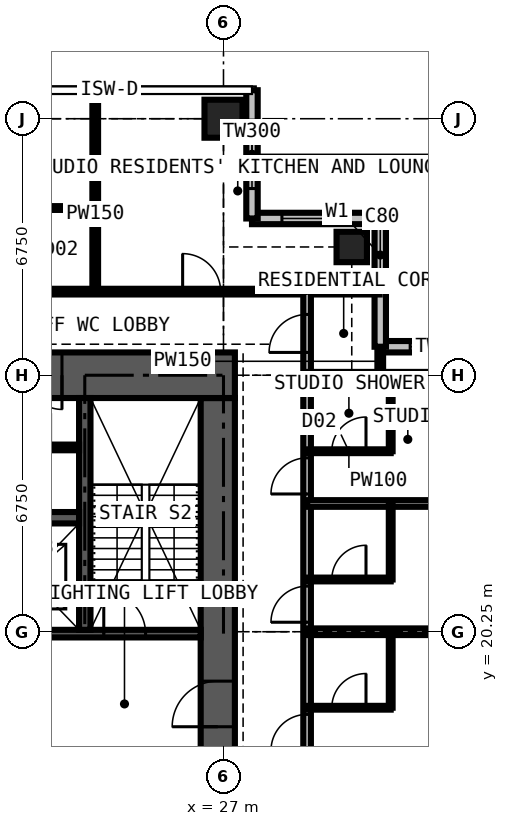
"""IFC4 building model, lengths in metres.
Left out: names, types, materials, properties, quantities, classifications, styles, units other than length and angle.
Written with IfcOpenShell. Run it as: python <this file> out.ifc"""

import sys

from ifc_helpers import new_model, si_unit, direction, frame, frame_2d, origin, origin_2d, place, context, subcontext, project, spatial, rectangle, extrude, element, fill, save


model = new_model("IFC4")
c1 = context("Model", 3, precision=1e-05, world=origin(), true_north=direction((0.0, 1.0)))
c2 = subcontext(c1, "Body", "Model", "MODEL_VIEW")
j1 = project(units=[si_unit("LENGTHUNIT", "METRE"), si_unit("PLANEANGLEUNIT", "RADIAN")], contexts=[c1])
p1 = place(None, origin())
s1 = spatial("IfcSite", under=j1, at=p1, CompositionType="ELEMENT")
p2 = place(p1, origin())
s2 = spatial("IfcBuilding", under=s1, at=p2, CompositionType="ELEMENT")
p3 = place(p2, frame((0.0, 0.0, 247.5)))
s3 = spatial("IfcBuildingStorey", under=s2, at=p3, CompositionType="ELEMENT", Elevation=247.5)
p4 = place(p3, frame((27.0, 33.75, 0.0), z_axis=(0.0, 0.0, 1.0), x_axis=(1.0, 0.0, 0.0)))
e1 = element("IfcColumn", 1, at=p4, inside=s3, PredefinedType="COLUMN", context=c2, shape_type="SweptSolid", body=[
    extrude(rectangle(XDim=1.0, YDim=1.0, at=origin_2d()), origin(), (0.0, 0.0, 1.0), 3.6),
])
p5 = place(p3, frame((30.375, 30.375, 0.0), z_axis=(0.0, 0.0, 1.0), x_axis=(1.0, 0.0, 0.0)))
e2 = element("IfcColumn", 2, at=p5, inside=s3, PredefinedType="COLUMN", context=c2, shape_type="SweptSolid", body=[
    extrude(rectangle(XDim=0.8, YDim=0.8, at=origin_2d()), origin(), (0.0, 0.0, 1.0), 3.6),
])
p6 = place(p3, frame((26.85, 14.1, 0.0), z_axis=(0.0, 0.0, 1.0), x_axis=(0.0, 1.0, 0.0)))
e3 = element("IfcWall", 3, at=p6, inside=s3, PredefinedType="SHEAR", context=c2, shape_type="SweptSolid", body=[
    extrude(rectangle(XDim=12.3, YDim=0.9, at=frame_2d((6.15, 0.0))), origin(), (0.0, 0.0, 1.0), 3.6),
])
p7 = place(p6, frame((3.65, 0.0, 0.0)))
e4 = element("IfcOpeningElement", 4, at=p7, cuts=e3, PredefinedType="OPENING", context=c2, shape_type="SweptSolid", body=[
    extrude(rectangle(XDim=1.2, YDim=2.2, at=frame_2d((0.6, 1.1))), frame((0.0, 0.46, 0.0), z_axis=(0.0, -1.0, 0.0), x_axis=(1.0, 0.0, 0.0)), (0.0, 0.0, 1.0), 0.92),
])
p8 = place(p3, frame((27.3, 27.0, 0.0), z_axis=(0.0, 0.0, 1.0), x_axis=(-1.0, 0.0, 0.0)))
e5 = element("IfcWall", 5, at=p8, inside=s3, PredefinedType="SHEAR", context=c2, shape_type="SweptSolid", body=[
    extrude(rectangle(XDim=14.1, YDim=1.2, at=frame_2d((7.05, 0.0))), origin(), (0.0, 0.0, 1.0), 3.6),
])
p9 = place(p8, frame((4.55, 0.0, 0.0)))
e6 = element("IfcOpeningElement", 6, at=p9, cuts=e5, PredefinedType="OPENING", context=c2, shape_type="SweptSolid", body=[
    extrude(rectangle(XDim=0.9, YDim=2.2, at=frame_2d((0.45, 1.1))), frame((0.0, 0.61, 0.0), z_axis=(0.0, -1.0, 0.0), x_axis=(1.0, 0.0, 0.0)), (0.0, 0.0, 1.0), 1.22),
])
p10 = place(p8, frame((7.525, 0.0, 0.0)))
e7 = element("IfcOpeningElement", 7, at=p10, cuts=e5, PredefinedType="OPENING", context=c2, shape_type="SweptSolid", body=[
    extrude(rectangle(XDim=1.0, YDim=2.2, at=frame_2d((0.5, 1.1))), frame((0.0, 0.61, 0.0), z_axis=(0.0, -1.0, 0.0), x_axis=(1.0, 0.0, 0.0)), (0.0, 0.0, 1.0), 1.22),
])
p11 = place(p3, frame((34.5, 27.75, 0.0), z_axis=(0.0, 0.0, 1.0), x_axis=(-1.0, 0.0, 0.0)))
e8 = element("IfcWall", 8, at=p11, inside=s3, PredefinedType="SOLIDWALL", context=c2, shape_type="SweptSolid", body=[
    extrude(rectangle(XDim=3.375, YDim=0.3, at=frame_2d((1.688, 0.0))), origin(), (0.0, 0.0, 1.0), 3.375),
])
p12 = place(p11, frame((0.788, 0.0, 0.6)))
e9 = element("IfcOpeningElement", 9, at=p12, cuts=e8, PredefinedType="OPENING", context=c2, shape_type="SweptSolid", body=[
    extrude(rectangle(XDim=1.8, YDim=2.1, at=frame_2d((0.9, 1.05))), frame((0.0, 0.16, 0.0), z_axis=(0.0, -1.0, 0.0), x_axis=(1.0, 0.0, 0.0)), (0.0, 0.0, 1.0), 0.32),
])
p13 = place(p3, frame((31.125, 27.75, 0.0), z_axis=(0.0, 0.0, 1.0), x_axis=(0.0, 1.0, 0.0)))
e10 = element("IfcWall", 10, at=p13, inside=s3, PredefinedType="SOLIDWALL", context=c2, shape_type="SweptSolid", body=[
    extrude(rectangle(XDim=3.375, YDim=0.3, at=frame_2d((1.688, 0.0))), origin(), (0.0, 0.0, 1.0), 3.375),
])
p14 = place(p13, frame((1.663, 0.0, 0.9)))
e11 = element("IfcOpeningElement", 11, at=p14, cuts=e10, PredefinedType="OPENING", context=c2, shape_type="SweptSolid", body=[
    extrude(rectangle(XDim=1.5, YDim=1.8, at=frame_2d((0.75, 0.9))), frame((0.0, 0.16, 0.0), z_axis=(0.0, -1.0, 0.0), x_axis=(1.0, 0.0, 0.0)), (0.0, 0.0, 1.0), 0.32),
])
p15 = place(p3, frame((31.125, 31.125, 0.0), z_axis=(0.0, 0.0, 1.0), x_axis=(-1.0, 0.0, 0.0)))
e12 = element("IfcWall", 12, at=p15, inside=s3, PredefinedType="SOLIDWALL", context=c2, shape_type="SweptSolid", body=[
    extrude(rectangle(XDim=3.375, YDim=0.3, at=frame_2d((1.688, 0.0))), origin(), (0.0, 0.0, 1.0), 3.375),
])
p16 = place(p15, frame((0.788, 0.0, 0.6)))
e13 = element("IfcOpeningElement", 13, at=p16, cuts=e12, PredefinedType="OPENING", context=c2, shape_type="SweptSolid", body=[
    extrude(rectangle(XDim=1.8, YDim=2.1, at=frame_2d((0.9, 1.05))), frame((0.0, 0.16, 0.0), z_axis=(0.0, -1.0, 0.0), x_axis=(1.0, 0.0, 0.0)), (0.0, 0.0, 1.0), 0.32),
])
p17 = place(p3, frame((27.75, 31.125, 0.0), z_axis=(0.0, 0.0, 1.0), x_axis=(0.0, 1.0, 0.0)))
e14 = element("IfcWall", 14, at=p17, inside=s3, PredefinedType="SOLIDWALL", context=c2, shape_type="SweptSolid", body=[
    extrude(rectangle(XDim=3.375, YDim=0.3, at=frame_2d((1.688, 0.0))), origin(), (0.0, 0.0, 1.0), 3.375),
])
p18 = place(p17, frame((0.788, 0.0, 0.6)))
e15 = element("IfcOpeningElement", 15, at=p18, cuts=e14, PredefinedType="OPENING", context=c2, shape_type="SweptSolid", body=[
    extrude(rectangle(XDim=1.8, YDim=2.1, at=frame_2d((0.9, 1.05))), frame((0.0, 0.16, 0.0), z_axis=(0.0, -1.0, 0.0), x_axis=(1.0, 0.0, 0.0)), (0.0, 0.0, 1.0), 0.32),
])
p19 = place(p3, frame((14.1, 20.2, 0.0), z_axis=(0.0, 0.0, 1.0), x_axis=(1.0, 0.0, 0.0)))
e16 = element("IfcWall", 16, at=p19, inside=s3, PredefinedType="SHEAR", context=c2, shape_type="SweptSolid", body=[
    extrude(rectangle(XDim=12.3, YDim=0.2, at=frame_2d((6.15, 0.0))), origin(), (0.0, 0.0, 1.0), 3.6),
])
p20 = place(p19, frame((4.56, 0.0, 0.0)))
e17 = element("IfcOpeningElement", 17, at=p20, cuts=e16, PredefinedType="OPENING", context=c2, shape_type="SweptSolid", body=[
    extrude(rectangle(XDim=1.1, YDim=2.2, at=frame_2d((0.55, 1.1))), frame((0.0, 0.11, 0.0), z_axis=(0.0, -1.0, 0.0), x_axis=(1.0, 0.0, 0.0)), (0.0, 0.0, 1.0), 0.22),
])
p21 = place(p19, frame((6.7, 0.0, 0.0)))
e18 = element("IfcOpeningElement", 18, at=p21, cuts=e16, PredefinedType="OPENING", context=c2, shape_type="SweptSolid", body=[
    extrude(rectangle(XDim=1.1, YDim=2.2, at=frame_2d((0.55, 1.1))), frame((0.0, 0.11, 0.0), z_axis=(0.0, -1.0, 0.0), x_axis=(1.0, 0.0, 0.0)), (0.0, 0.0, 1.0), 0.22),
])
p22 = place(p19, frame((0.35, 0.0, 0.0)))
e19 = element("IfcOpeningElement", 19, at=p22, cuts=e16, PredefinedType="OPENING", context=c2, shape_type="SweptSolid", body=[
    extrude(rectangle(XDim=1.1, YDim=2.2, at=frame_2d((0.55, 1.1))), frame((0.0, 0.11, 0.0), z_axis=(0.0, -1.0, 0.0), x_axis=(1.0, 0.0, 0.0)), (0.0, 0.0, 1.0), 0.22),
])
p23 = place(p19, frame((9.75, 0.0, 0.0)))
e20 = element("IfcOpeningElement", 20, at=p23, cuts=e16, PredefinedType="OPENING", context=c2, shape_type="SweptSolid", body=[
    extrude(rectangle(XDim=1.1, YDim=2.2, at=frame_2d((0.55, 1.1))), frame((0.0, 0.11, 0.0), z_axis=(0.0, -1.0, 0.0), x_axis=(1.0, 0.0, 0.0)), (0.0, 0.0, 1.0), 0.22),
])
p24 = place(p3, frame((23.35, 20.3, 0.0), z_axis=(0.0, 0.0, 1.0), x_axis=(0.0, 1.0, 0.0)))
e21 = element("IfcWall", 21, at=p24, inside=s3, PredefinedType="SHEAR", context=c2, shape_type="SweptSolid", body=[
    extrude(rectangle(XDim=6.1, YDim=0.3, at=frame_2d((3.05, 0.0))), origin(), (0.0, 0.0, 1.0), 3.6),
])
p25 = place(p3, frame((17.3, 23.25, 0.0), z_axis=(0.0, 0.0, 1.0), x_axis=(1.0, 0.0, 0.0)))
e22 = element("IfcWall", 22, at=p25, inside=s3, PredefinedType="SHEAR", context=c2, shape_type="SweptSolid", body=[
    extrude(rectangle(XDim=5.9, YDim=0.3, at=frame_2d((2.95, 0.0))), origin(), (0.0, 0.0, 1.0), 3.6),
])
p26 = place(p3, frame((20.8, 25.1, 0.0), z_axis=(0.0, 0.0, 1.0), x_axis=(1.0, 0.0, 0.0)))
e23 = element("IfcWall", 23, at=p26, inside=s3, PredefinedType="PARTITIONING", context=c2, shape_type="SweptSolid", body=[
    extrude(rectangle(XDim=2.4, YDim=0.15, at=frame_2d((1.2, 0.0))), origin(), (0.0, 0.0, 1.0), 3.375),
])
p27 = place(p26, frame((0.75, 0.0, 0.0)))
e24 = element("IfcOpeningElement", 24, at=p27, cuts=e23, PredefinedType="OPENING", context=c2, shape_type="SweptSolid", body=[
    extrude(rectangle(XDim=0.9, YDim=2.2, at=frame_2d((0.45, 1.1))), frame((0.0, 0.085, 0.0), z_axis=(0.0, -1.0, 0.0), x_axis=(1.0, 0.0, 0.0)), (0.0, 0.0, 1.0), 0.17),
])
p28 = place(p3, frame((11.3, 29.2, 0.0), z_axis=(0.0, 0.0, 1.0), x_axis=(1.0, 0.0, 0.0)))
e25 = element("IfcWall", 25, at=p28, inside=s3, PredefinedType="PARTITIONING", context=c2, shape_type="SweptSolid", body=[
    extrude(rectangle(XDim=19.809, YDim=0.15, at=frame_2d((9.904, 0.0))), origin(), (0.0, 0.0, 1.0), 3.375),
])
p29 = place(p28, frame((14.625, 0.0, 0.0)))
e26 = element("IfcOpeningElement", 26, at=p29, cuts=e25, PredefinedType="OPENING", context=c2, shape_type="SweptSolid", body=[
    extrude(rectangle(XDim=1.0, YDim=2.2, at=frame_2d((0.5, 1.1))), frame((0.0, 0.085, 0.0), z_axis=(0.0, -1.0, 0.0), x_axis=(1.0, 0.0, 0.0)), (0.0, 0.0, 1.0), 0.17),
])
p30 = place(p28, frame((6.4, 0.0, 0.0)))
e27 = element("IfcOpeningElement", 27, at=p30, cuts=e25, PredefinedType="OPENING", context=c2, shape_type="SweptSolid", body=[
    extrude(rectangle(XDim=0.95, YDim=2.2, at=frame_2d((0.475, 1.1))), frame((0.0, 0.085, 0.0), z_axis=(0.0, -1.0, 0.0), x_axis=(1.0, 0.0, 0.0)), (0.0, 0.0, 1.0), 0.17),
])
p31 = place(p28, frame((9.2, 0.0, 0.0)))
e28 = element("IfcOpeningElement", 28, at=p31, cuts=e25, PredefinedType="OPENING", context=c2, shape_type="SweptSolid", body=[
    extrude(rectangle(XDim=0.95, YDim=2.2, at=frame_2d((0.475, 1.1))), frame((0.0, 0.085, 0.0), z_axis=(0.0, -1.0, 0.0), x_axis=(1.0, 0.0, 0.0)), (0.0, 0.0, 1.0), 0.17),
])
p32 = place(p28, frame((0.6, 0.0, 0.0)))
e29 = element("IfcOpeningElement", 29, at=p32, cuts=e25, PredefinedType="OPENING", context=c2, shape_type="SweptSolid", body=[
    extrude(rectangle(XDim=1.0, YDim=2.2, at=frame_2d((0.5, 1.1))), frame((0.0, 0.085, 0.0), z_axis=(0.0, -1.0, 0.0), x_axis=(1.0, 0.0, 0.0)), (0.0, 0.0, 1.0), 0.17),
])
p33 = place(p3, frame((21.625, 31.4, 0.0), z_axis=(0.0, 0.0, 1.0), x_axis=(1.0, 0.0, 0.0)))
e30 = element("IfcWall", 30, at=p33, inside=s3, PredefinedType="PARTITIONING", context=c2, shape_type="SweptSolid", body=[
    extrude(rectangle(XDim=2.0, YDim=0.1, at=frame_2d((1.0, 0.0))), origin(), (0.0, 0.0, 1.0), 3.375),
])
p34 = place(p3, frame((23.625, 29.2, 0.0), z_axis=(0.0, 0.0, 1.0), x_axis=(0.0, 1.0, 0.0)))
e31 = element("IfcWall", 31, at=p34, inside=s3, PredefinedType="PARTITIONING", context=c2, shape_type="SweptSolid", body=[
    extrude(rectangle(XDim=5.284, YDim=0.15, at=frame_2d((2.642, 0.0))), origin(), (0.0, 0.0, 1.0), 3.375),
])
p35 = place(p3, frame((29.2, 11.3, 0.0), z_axis=(0.0, 0.0, 1.0), x_axis=(0.0, 1.0, 0.0)))
e32 = element("IfcWall", 32, at=p35, inside=s3, PredefinedType="PARTITIONING", context=c2, shape_type="SweptSolid", body=[
    extrude(rectangle(XDim=17.9, YDim=0.2, at=frame_2d((8.95, 0.0))), origin(), (0.0, 0.0, 1.0), 3.375),
])
p36 = place(p35, frame((0.6, 0.0, 0.0)))
e33 = element("IfcOpeningElement", 33, at=p36, cuts=e32, PredefinedType="OPENING", context=c2, shape_type="SweptSolid", body=[
    extrude(rectangle(XDim=1.0, YDim=2.2, at=frame_2d((0.5, 1.1))), frame((0.0, 0.11, 0.0), z_axis=(0.0, -1.0, 0.0), x_axis=(1.0, 0.0, 0.0)), (0.0, 0.0, 1.0), 0.22),
])
p37 = place(p35, frame((2.4, 0.0, 0.0)))
e34 = element("IfcOpeningElement", 34, at=p37, cuts=e32, PredefinedType="OPENING", context=c2, shape_type="SweptSolid", body=[
    extrude(rectangle(XDim=0.95, YDim=2.2, at=frame_2d((0.475, 1.1))), frame((0.0, 0.11, 0.0), z_axis=(0.0, -1.0, 0.0), x_axis=(1.0, 0.0, 0.0)), (0.0, 0.0, 1.0), 0.22),
])
p38 = place(p35, frame((5.825, 0.0, 0.0)))
e35 = element("IfcOpeningElement", 35, at=p38, cuts=e32, PredefinedType="OPENING", context=c2, shape_type="SweptSolid", body=[
    extrude(rectangle(XDim=0.95, YDim=2.2, at=frame_2d((0.475, 1.1))), frame((0.0, 0.11, 0.0), z_axis=(0.0, -1.0, 0.0), x_axis=(1.0, 0.0, 0.0)), (0.0, 0.0, 1.0), 0.22),
])
p39 = place(p35, frame((9.2, 0.0, 0.0)))
e36 = element("IfcOpeningElement", 36, at=p39, cuts=e32, PredefinedType="OPENING", context=c2, shape_type="SweptSolid", body=[
    extrude(rectangle(XDim=0.95, YDim=2.2, at=frame_2d((0.475, 1.1))), frame((0.0, 0.11, 0.0), z_axis=(0.0, -1.0, 0.0), x_axis=(1.0, 0.0, 0.0)), (0.0, 0.0, 1.0), 0.22),
])
p40 = place(p35, frame((12.575, 0.0, 0.0)))
e37 = element("IfcOpeningElement", 37, at=p40, cuts=e32, PredefinedType="OPENING", context=c2, shape_type="SweptSolid", body=[
    extrude(rectangle(XDim=0.95, YDim=2.2, at=frame_2d((0.475, 1.1))), frame((0.0, 0.11, 0.0), z_axis=(0.0, -1.0, 0.0), x_axis=(1.0, 0.0, 0.0)), (0.0, 0.0, 1.0), 0.22),
])
p41 = place(p35, frame((16.3, 0.0, 0.0)))
e38 = element("IfcOpeningElement", 38, at=p41, cuts=e32, PredefinedType="OPENING", context=c2, shape_type="SweptSolid", body=[
    extrude(rectangle(XDim=1.0, YDim=2.2, at=frame_2d((0.5, 1.1))), frame((0.0, 0.11, 0.0), z_axis=(0.0, -1.0, 0.0), x_axis=(1.0, 0.0, 0.0)), (0.0, 0.0, 1.0), 0.22),
])
p42 = place(p3, frame((29.2, 18.25, 0.0), z_axis=(0.0, 0.0, 1.0), x_axis=(1.0, 0.0, 0.0)))
e39 = element("IfcWall", 39, at=p42, inside=s3, PredefinedType="PARTITIONING", context=c2, shape_type="SweptSolid", body=[
    extrude(rectangle(XDim=2.2, YDim=0.1, at=frame_2d((1.1, 0.0))), origin(), (0.0, 0.0, 1.0), 3.375),
])
p43 = place(p42, frame((0.65, 0.0, 0.0)))
e40 = element("IfcOpeningElement", 40, at=p43, cuts=e39, PredefinedType="OPENING", context=c2, shape_type="SweptSolid", body=[
    extrude(rectangle(XDim=0.9, YDim=2.2, at=frame_2d((0.45, 1.1))), frame((0.0, 0.06, 0.0), z_axis=(0.0, -1.0, 0.0), x_axis=(1.0, 0.0, 0.0)), (0.0, 0.0, 1.0), 0.12),
])
p44 = place(p3, frame((29.2, 20.25, 0.0), z_axis=(0.0, 0.0, 1.0), x_axis=(1.0, 0.0, 0.0)))
e41 = element("IfcWall", 41, at=p44, inside=s3, PredefinedType="PARTITIONING", context=c2, shape_type="SweptSolid", body=[
    extrude(rectangle(XDim=5.284, YDim=0.175, at=frame_2d((2.642, 0.0))), origin(), (0.0, 0.0, 1.0), 2.877),
])
p45 = place(p3, frame((29.2, 21.625, 0.0), z_axis=(0.0, 0.0, 1.0), x_axis=(1.0, 0.0, 0.0)))
e42 = element("IfcWall", 42, at=p45, inside=s3, PredefinedType="PARTITIONING", context=c2, shape_type="SweptSolid", body=[
    extrude(rectangle(XDim=2.2, YDim=0.1, at=frame_2d((1.1, 0.0))), origin(), (0.0, 0.0, 1.0), 3.375),
])
p46 = place(p45, frame((0.65, 0.0, 0.0)))
e43 = element("IfcOpeningElement", 43, at=p46, cuts=e42, PredefinedType="OPENING", context=c2, shape_type="SweptSolid", body=[
    extrude(rectangle(XDim=0.9, YDim=2.2, at=frame_2d((0.45, 1.1))), frame((0.0, 0.06, 0.0), z_axis=(0.0, -1.0, 0.0), x_axis=(1.0, 0.0, 0.0)), (0.0, 0.0, 1.0), 0.12),
])
p47 = place(p3, frame((29.2, 23.625, 0.0), z_axis=(0.0, 0.0, 1.0), x_axis=(1.0, 0.0, 0.0)))
e44 = element("IfcWall", 44, at=p47, inside=s3, PredefinedType="PARTITIONING", context=c2, shape_type="SweptSolid", body=[
    extrude(rectangle(XDim=5.284, YDim=0.175, at=frame_2d((2.642, 0.0))), origin(), (0.0, 0.0, 1.0), 3.375),
])
p48 = place(p3, frame((29.2, 25.0, 0.0), z_axis=(0.0, 0.0, 1.0), x_axis=(1.0, 0.0, 0.0)))
e45 = element("IfcWall", 45, at=p48, inside=s3, PredefinedType="PARTITIONING", context=c2, shape_type="SweptSolid", body=[
    extrude(rectangle(XDim=2.2, YDim=0.1, at=frame_2d((1.1, 0.0))), origin(), (0.0, 0.0, 1.0), 3.375),
])
p49 = place(p48, frame((0.65, 0.0, 0.0)))
e46 = element("IfcOpeningElement", 46, at=p49, cuts=e45, PredefinedType="OPENING", context=c2, shape_type="SweptSolid", body=[
    extrude(rectangle(XDim=0.9, YDim=2.2, at=frame_2d((0.45, 1.1))), frame((0.0, 0.06, 0.0), z_axis=(0.0, -1.0, 0.0), x_axis=(1.0, 0.0, 0.0)), (0.0, 0.0, 1.0), 0.12),
])
p50 = place(p3, frame((29.2, 27.0, 0.0), z_axis=(0.0, 0.0, 1.0), x_axis=(1.0, 0.0, 0.0)))
e47 = element("IfcWall", 47, at=p50, inside=s3, PredefinedType="PARTITIONING", context=c2, shape_type="SweptSolid", body=[
    extrude(rectangle(XDim=5.284, YDim=0.175, at=frame_2d((2.642, 0.0))), origin(), (0.0, 0.0, 1.0), 2.877),
])
p51 = place(p3, frame((31.125, 27.0, 0.0), z_axis=(0.0, 0.0, 1.0), x_axis=(0.0, 1.0, 0.0)))
e48 = element("IfcWall", 48, at=p51, inside=s3, PredefinedType="PARTITIONING", context=c2, shape_type="SweptSolid", body=[
    extrude(rectangle(XDim=0.734, YDim=0.15, at=frame_2d((0.367, 0.0))), origin(), (0.0, 0.0, 1.0), 3.375),
])
for number, where, z_axis, x_axis in (
    (49, (31.4, 18.25, 0.0), (0.0, 0.0, 1.0), (0.0, 1.0, 0.0)),
    (50, (31.4, 21.625, 0.0), (0.0, 0.0, 1.0), (0.0, 1.0, 0.0)),
    (51, (31.4, 25.0, 0.0), (0.0, 0.0, 1.0), (0.0, 1.0, 0.0)),
):
    element("IfcWall", number, at=place(p3, frame(where, z_axis=z_axis, x_axis=x_axis)), inside=s3, PredefinedType="PARTITIONING", context=c2, shape_type="SweptSolid", body=[
        extrude(rectangle(XDim=2.0, YDim=0.1, at=frame_2d((1.0, 0.0))), origin(), (0.0, 0.0, 1.0), 3.375),
    ])
p52 = place(p12, origin())
e52 = element("IfcWindow", 52, at=p52, inside=s3, PartitioningType="SINGLE_PANEL", PredefinedType="WINDOW", context=c2, shape_type="SweptSolid", body=[
    extrude(rectangle(XDim=1.8, YDim=2.1, at=frame_2d((0.9, 1.05))), frame((0.0, 0.03, 0.0), z_axis=(0.0, -1.0, 0.0), x_axis=(1.0, 0.0, 0.0)), (0.0, 0.0, 1.0), 0.06),
])
fill(e9, e52)
p53 = place(p14, origin())
e53 = element("IfcWindow", 53, at=p53, inside=s3, PartitioningType="SINGLE_PANEL", PredefinedType="WINDOW", context=c2, shape_type="SweptSolid", body=[
    extrude(rectangle(XDim=1.5, YDim=1.8, at=frame_2d((0.75, 0.9))), frame((0.0, 0.03, 0.0), z_axis=(0.0, -1.0, 0.0), x_axis=(1.0, 0.0, 0.0)), (0.0, 0.0, 1.0), 0.06),
])
fill(e11, e53)
p54 = place(p16, origin())
e54 = element("IfcWindow", 54, at=p54, inside=s3, PartitioningType="SINGLE_PANEL", PredefinedType="WINDOW", context=c2, shape_type="SweptSolid", body=[
    extrude(rectangle(XDim=1.8, YDim=2.1, at=frame_2d((0.9, 1.05))), frame((0.0, 0.03, 0.0), z_axis=(0.0, -1.0, 0.0), x_axis=(1.0, 0.0, 0.0)), (0.0, 0.0, 1.0), 0.06),
])
fill(e13, e54)
p55 = place(p18, origin())
e55 = element("IfcWindow", 55, at=p55, inside=s3, PartitioningType="SINGLE_PANEL", PredefinedType="WINDOW", context=c2, shape_type="SweptSolid", body=[
    extrude(rectangle(XDim=1.8, YDim=2.1, at=frame_2d((0.9, 1.05))), frame((0.0, 0.03, 0.0), z_axis=(0.0, -1.0, 0.0), x_axis=(1.0, 0.0, 0.0)), (0.0, 0.0, 1.0), 0.06),
])
fill(e15, e55)
p56 = place(p7, origin())
e56 = element("IfcDoor", 56, at=p56, inside=s3, OperationType="DOUBLE_DOOR_SINGLE_SWING", PredefinedType="DOOR", context=c2, shape_type="SweptSolid", body=[
    extrude(rectangle(XDim=1.2, YDim=2.2, at=frame_2d((0.6, 1.1))), frame((0.0, 0.025, 0.0), z_axis=(0.0, -1.0, 0.0), x_axis=(1.0, 0.0, 0.0)), (0.0, 0.0, 1.0), 0.05),
])
fill(e4, e56)
p57 = place(p9, origin())
e57 = element("IfcDoor", 57, at=p57, inside=s3, OperationType="SINGLE_SWING_LEFT", PredefinedType="DOOR", context=c2, shape_type="SweptSolid", body=[
    extrude(rectangle(XDim=0.9, YDim=2.2, at=frame_2d((0.45, 1.1))), frame((0.0, 0.4, 0.0), z_axis=(0.0, -1.0, 0.0), x_axis=(1.0, 0.0, 0.0)), (0.0, 0.0, 1.0), 0.8),
])
fill(e6, e57)
p58 = place(p23, origin())
e58 = element("IfcDoor", 58, at=p58, inside=s3, OperationType="SINGLE_SWING_LEFT", PredefinedType="DOOR", context=c2, shape_type="SweptSolid", body=[
    extrude(rectangle(XDim=1.1, YDim=2.2, at=frame_2d((0.55, 1.1))), frame((0.0, 0.025, 0.0), z_axis=(0.0, -1.0, 0.0), x_axis=(1.0, 0.0, 0.0)), (0.0, 0.0, 1.0), 0.05),
])
fill(e20, e58)
p59 = place(p38, origin())
e59 = element("IfcDoor", 59, at=p59, inside=s3, OperationType="SINGLE_SWING_LEFT", PredefinedType="DOOR", context=c2, shape_type="SweptSolid", body=[
    extrude(rectangle(XDim=0.95, YDim=2.2, at=frame_2d((0.475, 1.1))), frame((0.0, 0.025, 0.0), z_axis=(0.0, -1.0, 0.0), x_axis=(1.0, 0.0, 0.0)), (0.0, 0.0, 1.0), 0.05),
])
fill(e35, e59)
p60 = place(p43, origin())
e60 = element("IfcDoor", 60, at=p60, inside=s3, OperationType="SINGLE_SWING_RIGHT", PredefinedType="DOOR", context=c2, shape_type="SweptSolid", body=[
    extrude(rectangle(XDim=0.9, YDim=2.2, at=frame_2d((0.45, 1.1))), frame((0.0, 0.025, 0.0), z_axis=(0.0, -1.0, 0.0), x_axis=(1.0, 0.0, 0.0)), (0.0, 0.0, 1.0), 0.05),
])
fill(e40, e60)
p61 = place(p39, origin())
e61 = element("IfcDoor", 61, at=p61, inside=s3, OperationType="SINGLE_SWING_LEFT", PredefinedType="DOOR", context=c2, shape_type="SweptSolid", body=[
    extrude(rectangle(XDim=0.95, YDim=2.2, at=frame_2d((0.475, 1.1))), frame((0.0, 0.025, 0.0), z_axis=(0.0, -1.0, 0.0), x_axis=(1.0, 0.0, 0.0)), (0.0, 0.0, 1.0), 0.05),
])
fill(e36, e61)
p62 = place(p46, origin())
e62 = element("IfcDoor", 62, at=p62, inside=s3, OperationType="SINGLE_SWING_RIGHT", PredefinedType="DOOR", context=c2, shape_type="SweptSolid", body=[
    extrude(rectangle(XDim=0.9, YDim=2.2, at=frame_2d((0.45, 1.1))), frame((0.0, 0.025, 0.0), z_axis=(0.0, -1.0, 0.0), x_axis=(1.0, 0.0, 0.0)), (0.0, 0.0, 1.0), 0.05),
])
fill(e43, e62)
p63 = place(p40, origin())
e63 = element("IfcDoor", 63, at=p63, inside=s3, OperationType="SINGLE_SWING_LEFT", PredefinedType="DOOR", context=c2, shape_type="SweptSolid", body=[
    extrude(rectangle(XDim=0.95, YDim=2.2, at=frame_2d((0.475, 1.1))), frame((0.0, 0.025, 0.0), z_axis=(0.0, -1.0, 0.0), x_axis=(1.0, 0.0, 0.0)), (0.0, 0.0, 1.0), 0.05),
])
fill(e37, e63)
p64 = place(p49, origin())
e64 = element("IfcDoor", 64, at=p64, inside=s3, OperationType="SINGLE_SWING_RIGHT", PredefinedType="DOOR", context=c2, shape_type="SweptSolid", body=[
    extrude(rectangle(XDim=0.9, YDim=2.2, at=frame_2d((0.45, 1.1))), frame((0.0, 0.025, 0.0), z_axis=(0.0, -1.0, 0.0), x_axis=(1.0, 0.0, 0.0)), (0.0, 0.0, 1.0), 0.05),
])
fill(e46, e64)
p65 = place(p41, origin())
e65 = element("IfcDoor", 65, at=p65, inside=s3, OperationType="SINGLE_SWING_LEFT", PredefinedType="DOOR", context=c2, shape_type="SweptSolid", body=[
    extrude(rectangle(XDim=1.0, YDim=2.2, at=frame_2d((0.5, 1.1))), frame((0.0, 0.025, 0.0), z_axis=(0.0, -1.0, 0.0), x_axis=(1.0, 0.0, 0.0)), (0.0, 0.0, 1.0), 0.05),
])
fill(e38, e65)
p66 = place(p29, origin())
e66 = element("IfcDoor", 66, at=p66, inside=s3, OperationType="SINGLE_SWING_LEFT", PredefinedType="DOOR", context=c2, shape_type="SweptSolid", body=[
    extrude(rectangle(XDim=1.0, YDim=2.2, at=frame_2d((0.5, 1.1))), frame((0.0, 0.025, 0.0), z_axis=(0.0, -1.0, 0.0), x_axis=(1.0, 0.0, 0.0)), (0.0, 0.0, 1.0), 0.05),
])
fill(e26, e66)
save(model, sys.argv[1])
